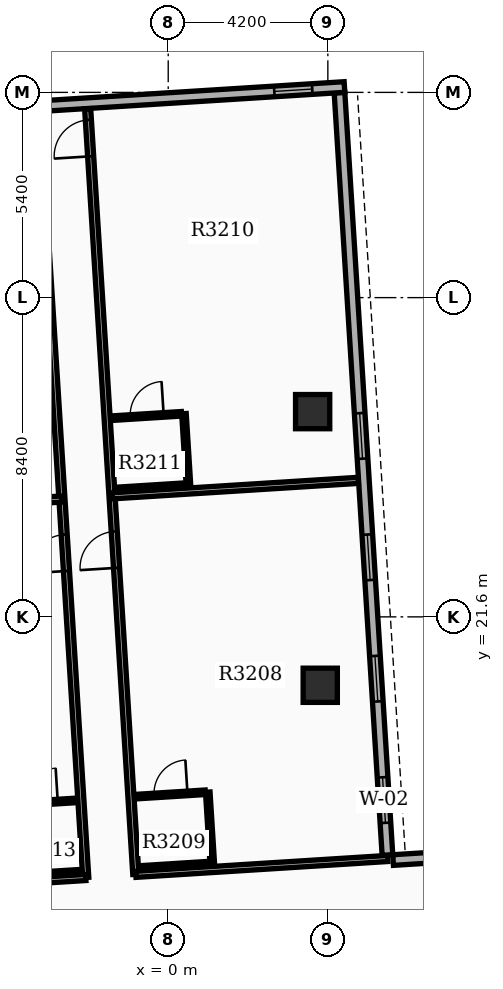
"""IFC4 building model, lengths in metres.
Left out: names, types, materials, properties, quantities, classifications, styles, units other than length and angle.
Written with IfcOpenShell. Run it as: python <this file> out.ifc"""

import sys

from ifc_helpers import new_model, si_unit, direction, frame, frame_2d, origin, origin_2d, place, context, subcontext, project, spatial, rectangle, extrude, element, fill, save


model = new_model("IFC4")
c1 = context("Model", 3, precision=1e-05, world=origin(), true_north=direction((0.0, 1.0)))
c2 = subcontext(c1, "Body", "Model", "MODEL_VIEW")
j1 = project(units=[si_unit("LENGTHUNIT", "METRE"), si_unit("PLANEANGLEUNIT", "RADIAN")], contexts=[c1])
p1 = place(None, origin())
s1 = spatial("IfcSite", under=j1, at=p1, CompositionType="ELEMENT")
p2 = place(p1, origin())
s2 = spatial("IfcBuilding", under=s1, at=p2, CompositionType="ELEMENT")
p3 = place(p2, frame((0.0, 0.0, 201.3)))
s3 = spatial("IfcBuildingStorey", under=s2, at=p3, CompositionType="ELEMENT", Elevation=201.3)
for number, where, z_axis, x_axis in (
    (1, (4.0, 19.8, 0.0), (0.0, 0.0, 1.0), (1.0, 0.0, 0.0)),
    (2, (3.8, 27.0, 0.0), (0.0, 0.0, 1.0), (1.0, 0.0, 0.0)),
):
    element("IfcColumn", number, at=place(p3, frame(where, z_axis=z_axis, x_axis=x_axis)), inside=s3, PredefinedType="COLUMN", context=c2, shape_type="SweptSolid", body=[
        extrude(rectangle(XDim=0.9, YDim=0.9, at=origin_2d()), origin(), (0.0, 0.0, 1.0), 3.9),
    ])
p4 = place(p3, frame((5.769, 15.333, 0.0), z_axis=(0.0, 0.0, 1.0), x_axis=(-0.062784355807, 0.998027116198, 0.0)))
e3 = element("IfcWall", 3, at=p4, inside=s3, PredefinedType="STANDARD", context=c2, shape_type="SweptSolid", body=[
    extrude(rectangle(XDim=20.1, YDim=0.28, at=frame_2d((10.05, 0.0))), origin(), (0.0, 0.0, 1.0), 3.18),
])
p5 = place(p4, frame((0.85, 0.0, 0.8)))
e4 = element("IfcOpeningElement", 4, at=p5, cuts=e3, PredefinedType="OPENING", context=c2, shape_type="SweptSolid", body=[
    extrude(rectangle(XDim=1.2, YDim=1.6, at=frame_2d((0.6, 0.8))), frame((0.0, 0.15, 0.0), z_axis=(0.0, -1.0, 0.0), x_axis=(1.0, 0.0, 0.0)), (0.0, 0.0, 1.0), 0.3),
])
p6 = place(p4, frame((4.05, 0.0, 0.8)))
e5 = element("IfcOpeningElement", 5, at=p6, cuts=e3, PredefinedType="OPENING", context=c2, shape_type="SweptSolid", body=[
    extrude(rectangle(XDim=1.2, YDim=1.6, at=frame_2d((0.6, 0.8))), frame((0.0, 0.15, 0.0), z_axis=(0.0, -1.0, 0.0), x_axis=(1.0, 0.0, 0.0)), (0.0, 0.0, 1.0), 0.3),
])
p7 = place(p4, frame((7.25, 0.0, 0.8)))
e6 = element("IfcOpeningElement", 6, at=p7, cuts=e3, PredefinedType="OPENING", context=c2, shape_type="SweptSolid", body=[
    extrude(rectangle(XDim=1.2, YDim=1.6, at=frame_2d((0.6, 0.8))), frame((0.0, 0.15, 0.0), z_axis=(0.0, -1.0, 0.0), x_axis=(1.0, 0.0, 0.0)), (0.0, 0.0, 1.0), 0.3),
])
p8 = place(p4, frame((10.45, 0.0, 0.8)))
e7 = element("IfcOpeningElement", 7, at=p8, cuts=e3, PredefinedType="OPENING", context=c2, shape_type="SweptSolid", body=[
    extrude(rectangle(XDim=1.2, YDim=1.6, at=frame_2d((0.6, 0.8))), frame((0.0, 0.15, 0.0), z_axis=(0.0, -1.0, 0.0), x_axis=(1.0, 0.0, 0.0)), (0.0, 0.0, 1.0), 0.3),
])
p9 = place(p3, frame((4.637, 35.541, 0.0), z_axis=(0.0, 0.0, 1.0), x_axis=(-0.998026318072, -0.062797041623, 0.0)))
e8 = element("IfcWall", 8, at=p9, inside=s3, PredefinedType="STANDARD", context=c2, shape_type="SweptSolid", body=[
    extrude(rectangle(XDim=13.72, YDim=0.28, at=frame_2d((6.86, 0.0))), origin(), (0.0, 0.0, 1.0), 3.18),
])
p10 = place(p9, frame((0.85, 0.0, 0.85)))
e9 = element("IfcOpeningElement", 9, at=p10, cuts=e8, PredefinedType="OPENING", context=c2, shape_type="SweptSolid", body=[
    extrude(rectangle(XDim=1.0, YDim=1.5, at=frame_2d((0.5, 0.75))), frame((0.0, 0.15, 0.0), z_axis=(0.0, -1.0, 0.0), x_axis=(1.0, 0.0, 0.0)), (0.0, 0.0, 1.0), 0.3),
])
p11 = place(p3, frame((12.205, 15.597, 0.0), z_axis=(0.0, 0.0, 1.0), x_axis=(-0.998024885752, -0.062819801181, 0.0)))
e10 = element("IfcWall", 10, at=p11, inside=s3, PredefinedType="STANDARD", context=c2, shape_type="SweptSolid", body=[
    extrude(rectangle(XDim=6.3, YDim=0.28, at=frame_2d((3.15, 0.0))), origin(), (0.0, 0.0, 1.0), 3.18),
])
p12 = place(p3, frame((-0.853, 14.826, 0.0), z_axis=(0.0, 0.0, 1.0), x_axis=(-0.062794751284, 0.99802646218, 0.0)))
e11 = element("IfcWall", 11, at=p12, inside=s3, PredefinedType="PARTITIONING", context=c2, shape_type="SweptSolid", body=[
    extrude(rectangle(XDim=20.182, YDim=0.16, at=frame_2d((10.091, 0.0))), origin(), (0.0, 0.0, 1.0), 3.17),
])
p13 = place(p12, frame((8.08, 0.0, 0.0)))
e12 = element("IfcOpeningElement", 12, at=p13, cuts=e11, PredefinedType="OPENING", context=c2, shape_type="SweptSolid", body=[
    extrude(rectangle(XDim=0.96, YDim=2.15, at=frame_2d((0.48, 1.075))), frame((0.0, 0.09, 0.0), z_axis=(0.0, -1.0, 0.0), x_axis=(1.0, 0.0, 0.0)), (0.0, 0.0, 1.0), 0.18),
])
p14 = place(p12, frame((18.93, 0.0, 0.0)))
e13 = element("IfcOpeningElement", 13, at=p14, cuts=e11, PredefinedType="OPENING", context=c2, shape_type="SweptSolid", body=[
    extrude(rectangle(XDim=0.96, YDim=2.15, at=frame_2d((0.48, 1.075))), frame((0.0, 0.09, 0.0), z_axis=(0.0, -1.0, 0.0), x_axis=(1.0, 0.0, 0.0)), (0.0, 0.0, 1.0), 0.18),
])
p15 = place(p3, frame((-0.853, 14.826, 0.0), z_axis=(0.0, 0.0, 1.0), x_axis=(0.998026165557, 0.062799465472, 0.0)))
e14 = element("IfcWall", 14, at=p15, inside=s3, PredefinedType="PARTITIONING", context=c2, shape_type="SweptSolid", body=[
    extrude(rectangle(XDim=6.64, YDim=0.16, at=frame_2d((3.32, 0.0))), origin(), (0.0, 0.0, 1.0), 3.17),
])
p16 = place(p3, frame((-1.479, 24.784, 0.0), z_axis=(0.0, 0.0, 1.0), x_axis=(0.998025855021, 0.062804400403, 0.0)))
e15 = element("IfcWall", 15, at=p16, inside=s3, PredefinedType="PARTITIONING", context=c2, shape_type="SweptSolid", body=[
    extrude(rectangle(XDim=6.492, YDim=0.16, at=frame_2d((3.246, 0.0))), origin(), (0.0, 0.0, 1.0), 3.17),
])
p17 = place(p3, frame((-0.841, 16.871, 0.0), z_axis=(0.0, 0.0, 1.0), x_axis=(0.998027443946, 0.062779145668, 0.0)))
e16 = element("IfcWall", 16, at=p17, inside=s3, PredefinedType="PARTITIONING", context=c2, shape_type="SweptSolid", body=[
    extrude(rectangle(XDim=1.82, YDim=0.12, at=frame_2d((0.91, 0.0))), origin(), (0.0, 0.0, 1.0), 3.17),
])
p18 = place(p17, frame((0.47, 0.0, 0.0)))
e17 = element("IfcOpeningElement", 17, at=p18, cuts=e16, PredefinedType="OPENING", context=c2, shape_type="SweptSolid", body=[
    extrude(rectangle(XDim=0.88, YDim=2.1, at=frame_2d((0.44, 1.05))), frame((0.0, 0.07, 0.0), z_axis=(0.0, -1.0, 0.0), x_axis=(1.0, 0.0, 0.0)), (0.0, 0.0, 1.0), 0.14),
])
p19 = place(p3, frame((-0.723, 14.994, 0.0), z_axis=(0.0, 0.0, 1.0), x_axis=(0.998027443946, 0.062779145668, 0.0)))
e18 = element("IfcWall", 18, at=p19, inside=s3, PredefinedType="PARTITIONING", context=c2, shape_type="SweptSolid", body=[
    extrude(rectangle(XDim=1.82, YDim=0.12, at=frame_2d((0.91, 0.0))), origin(), (0.0, 0.0, 1.0), 3.17),
])
p20 = place(p3, frame((1.158, 15.113, 0.0), z_axis=(0.0, 0.0, 1.0), x_axis=(-0.062855297722, 0.998022650819, 0.0)))
e19 = element("IfcWall", 19, at=p20, inside=s3, PredefinedType="PARTITIONING", context=c2, shape_type="SweptSolid", body=[
    extrude(rectangle(XDim=1.88, YDim=0.12, at=frame_2d((0.94, 0.0))), origin(), (0.0, 0.0, 1.0), 3.17),
])
p21 = place(p3, frame((-1.468, 26.829, 0.0), z_axis=(0.0, 0.0, 1.0), x_axis=(0.998027443946, 0.062779145668, 0.0)))
e20 = element("IfcWall", 20, at=p21, inside=s3, PredefinedType="PARTITIONING", context=c2, shape_type="SweptSolid", body=[
    extrude(rectangle(XDim=1.82, YDim=0.12, at=frame_2d((0.91, 0.0))), origin(), (0.0, 0.0, 1.0), 3.17),
])
p22 = place(p21, frame((0.47, 0.0, 0.0)))
e21 = element("IfcOpeningElement", 21, at=p22, cuts=e20, PredefinedType="OPENING", context=c2, shape_type="SweptSolid", body=[
    extrude(rectangle(XDim=0.88, YDim=2.1, at=frame_2d((0.44, 1.05))), frame((0.0, 0.07, 0.0), z_axis=(0.0, -1.0, 0.0), x_axis=(1.0, 0.0, 0.0)), (0.0, 0.0, 1.0), 0.14),
])
p23 = place(p3, frame((-1.349, 24.952, 0.0), z_axis=(0.0, 0.0, 1.0), x_axis=(0.998019030272, 0.062912758763, 0.0)))
e22 = element("IfcWall", 22, at=p23, inside=s3, PredefinedType="PARTITIONING", context=c2, shape_type="SweptSolid", body=[
    extrude(rectangle(XDim=1.82, YDim=0.12, at=frame_2d((0.91, 0.0))), origin(), (0.0, 0.0, 1.0), 3.17),
])
p24 = place(p3, frame((0.532, 25.071, 0.0), z_axis=(0.0, 0.0, 1.0), x_axis=(-0.062717813936, 0.998031300018, 0.0)))
e23 = element("IfcWall", 23, at=p24, inside=s3, PredefinedType="PARTITIONING", context=c2, shape_type="SweptSolid", body=[
    extrude(rectangle(XDim=1.88, YDim=0.12, at=frame_2d((0.94, 0.0))), origin(), (0.0, 0.0, 1.0), 3.17),
])
p25 = place(p3, frame((-2.17, 14.743, 0.0), z_axis=(0.0, 0.0, 1.0), x_axis=(-0.062795509413, 0.998026414479, 0.0)))
e24 = element("IfcWall", 24, at=p25, inside=s3, PredefinedType="PARTITIONING", context=c2, shape_type="SweptSolid", body=[
    extrude(rectangle(XDim=20.182, YDim=0.16, at=frame_2d((10.091, 0.0))), origin(), (0.0, 0.0, 1.0), 3.17),
])
p26 = place(p25, frame((8.08, 0.0, 0.0)))
e25 = element("IfcOpeningElement", 25, at=p26, cuts=e24, PredefinedType="OPENING", context=c2, shape_type="SweptSolid", body=[
    extrude(rectangle(XDim=0.96, YDim=2.15, at=frame_2d((0.48, 1.075))), frame((0.0, 0.09, 0.0), z_axis=(0.0, -1.0, 0.0), x_axis=(1.0, 0.0, 0.0)), (0.0, 0.0, 1.0), 0.18),
])
p27 = place(p25, frame((16.247, 0.0, 0.0)))
e26 = element("IfcOpeningElement", 26, at=p27, cuts=e24, PredefinedType="OPENING", context=c2, shape_type="SweptSolid", body=[
    extrude(rectangle(XDim=0.96, YDim=2.15, at=frame_2d((0.48, 1.075))), frame((0.0, 0.09, 0.0), z_axis=(0.0, -1.0, 0.0), x_axis=(1.0, 0.0, 0.0)), (0.0, 0.0, 1.0), 0.18),
])
p28 = place(p3, frame((-2.17, 14.743, 0.0), z_axis=(0.0, 0.0, 1.0), x_axis=(-0.998025093119, -0.06281650662, 0.0)))
e27 = element("IfcWall", 27, at=p28, inside=s3, PredefinedType="PARTITIONING", context=c2, shape_type="SweptSolid", body=[
    extrude(rectangle(XDim=5.48, YDim=0.16, at=frame_2d((2.74, 0.0))), origin(), (0.0, 0.0, 1.0), 3.17),
])
p29 = place(p3, frame((-2.796, 24.701, 0.0), z_axis=(0.0, 0.0, 1.0), x_axis=(-0.998027735445, -0.062774511414, 0.0)))
e28 = element("IfcWall", 28, at=p29, inside=s3, PredefinedType="PARTITIONING", context=c2, shape_type="SweptSolid", body=[
    extrude(rectangle(XDim=5.332, YDim=0.16, at=frame_2d((2.666, 0.0))), origin(), (0.0, 0.0, 1.0), 3.17),
])
p30 = place(p3, frame((-4.254, 16.656, 0.0), z_axis=(0.0, 0.0, 1.0), x_axis=(0.998027443946, 0.062779145668, 0.0)))
e29 = element("IfcWall", 29, at=p30, inside=s3, PredefinedType="PARTITIONING", context=c2, shape_type="SweptSolid", body=[
    extrude(rectangle(XDim=1.82, YDim=0.12, at=frame_2d((0.91, 0.0))), origin(), (0.0, 0.0, 1.0), 3.17),
])
p31 = place(p30, frame((0.47, 0.0, 0.0)))
e30 = element("IfcOpeningElement", 30, at=p31, cuts=e29, PredefinedType="OPENING", context=c2, shape_type="SweptSolid", body=[
    extrude(rectangle(XDim=0.88, YDim=2.1, at=frame_2d((0.44, 1.05))), frame((0.0, 0.07, 0.0), z_axis=(0.0, -1.0, 0.0), x_axis=(1.0, 0.0, 0.0)), (0.0, 0.0, 1.0), 0.14),
])
p32 = place(p3, frame((-4.136, 14.78, 0.0), z_axis=(0.0, 0.0, 1.0), x_axis=(0.998027443946, 0.062779145668, 0.0)))
e31 = element("IfcWall", 31, at=p32, inside=s3, PredefinedType="PARTITIONING", context=c2, shape_type="SweptSolid", body=[
    extrude(rectangle(XDim=1.82, YDim=0.12, at=frame_2d((0.91, 0.0))), origin(), (0.0, 0.0, 1.0), 3.17),
])
p33 = place(p5, origin())
e32 = element("IfcWindow", 32, at=p33, inside=s3, PartitioningType="SINGLE_PANEL", PredefinedType="WINDOW", context=c2, shape_type="SweptSolid", body=[
    extrude(rectangle(XDim=1.2, YDim=1.6, at=frame_2d((0.6, 0.8))), frame((0.0, 0.03, 0.0), z_axis=(0.0, -1.0, 0.0), x_axis=(1.0, 0.0, 0.0)), (0.0, 0.0, 1.0), 0.06),
])
fill(e4, e32)
p34 = place(p6, origin())
e33 = element("IfcWindow", 33, at=p34, inside=s3, PartitioningType="SINGLE_PANEL", PredefinedType="WINDOW", context=c2, shape_type="SweptSolid", body=[
    extrude(rectangle(XDim=1.2, YDim=1.6, at=frame_2d((0.6, 0.8))), frame((0.0, 0.03, 0.0), z_axis=(0.0, -1.0, 0.0), x_axis=(1.0, 0.0, 0.0)), (0.0, 0.0, 1.0), 0.06),
])
fill(e5, e33)
p35 = place(p7, origin())
e34 = element("IfcWindow", 34, at=p35, inside=s3, PartitioningType="SINGLE_PANEL", PredefinedType="WINDOW", context=c2, shape_type="SweptSolid", body=[
    extrude(rectangle(XDim=1.2, YDim=1.6, at=frame_2d((0.6, 0.8))), frame((0.0, 0.03, 0.0), z_axis=(0.0, -1.0, 0.0), x_axis=(1.0, 0.0, 0.0)), (0.0, 0.0, 1.0), 0.06),
])
fill(e6, e34)
p36 = place(p8, origin())
e35 = element("IfcWindow", 35, at=p36, inside=s3, PartitioningType="SINGLE_PANEL", PredefinedType="WINDOW", context=c2, shape_type="SweptSolid", body=[
    extrude(rectangle(XDim=1.2, YDim=1.6, at=frame_2d((0.6, 0.8))), frame((0.0, 0.03, 0.0), z_axis=(0.0, -1.0, 0.0), x_axis=(1.0, 0.0, 0.0)), (0.0, 0.0, 1.0), 0.06),
])
fill(e7, e35)
p37 = place(p10, origin())
e36 = element("IfcWindow", 36, at=p37, inside=s3, PartitioningType="SINGLE_PANEL", PredefinedType="WINDOW", context=c2, shape_type="SweptSolid", body=[
    extrude(rectangle(XDim=1.0, YDim=1.5, at=frame_2d((0.5, 0.75))), frame((0.0, 0.03, 0.0), z_axis=(0.0, -1.0, 0.0), x_axis=(1.0, 0.0, 0.0)), (0.0, 0.0, 1.0), 0.06),
])
fill(e9, e36)
p38 = place(p13, origin())
e37 = element("IfcDoor", 37, at=p38, inside=s3, OperationType="SINGLE_SWING_LEFT", PredefinedType="DOOR", context=c2, shape_type="SweptSolid", body=[
    extrude(rectangle(XDim=0.96, YDim=2.15, at=frame_2d((0.48, 1.075))), frame((0.0, 0.025, 0.0), z_axis=(0.0, -1.0, 0.0), x_axis=(1.0, 0.0, 0.0)), (0.0, 0.0, 1.0), 0.05),
])
fill(e12, e37)
p39 = place(p18, origin())
e38 = element("IfcDoor", 38, at=p39, inside=s3, OperationType="SINGLE_SWING_RIGHT", PredefinedType="DOOR", context=c2, shape_type="SweptSolid", body=[
    extrude(rectangle(XDim=0.88, YDim=2.1, at=frame_2d((0.44, 1.05))), frame((0.0, 0.025, 0.0), z_axis=(0.0, -1.0, 0.0), x_axis=(1.0, 0.0, 0.0)), (0.0, 0.0, 1.0), 0.05),
])
fill(e17, e38)
p40 = place(p14, origin())
e39 = element("IfcDoor", 39, at=p40, inside=s3, OperationType="SINGLE_SWING_LEFT", PredefinedType="DOOR", context=c2, shape_type="SweptSolid", body=[
    extrude(rectangle(XDim=0.96, YDim=2.15, at=frame_2d((0.48, 1.075))), frame((0.0, 0.025, 0.0), z_axis=(0.0, -1.0, 0.0), x_axis=(1.0, 0.0, 0.0)), (0.0, 0.0, 1.0), 0.05),
])
fill(e13, e39)
p41 = place(p22, origin())
e40 = element("IfcDoor", 40, at=p41, inside=s3, OperationType="SINGLE_SWING_RIGHT", PredefinedType="DOOR", context=c2, shape_type="SweptSolid", body=[
    extrude(rectangle(XDim=0.88, YDim=2.1, at=frame_2d((0.44, 1.05))), frame((0.0, 0.025, 0.0), z_axis=(0.0, -1.0, 0.0), x_axis=(1.0, 0.0, 0.0)), (0.0, 0.0, 1.0), 0.05),
])
fill(e21, e40)
p42 = place(p26, origin())
e41 = element("IfcDoor", 41, at=p42, inside=s3, OperationType="SINGLE_SWING_LEFT", PredefinedType="DOOR", context=c2, shape_type="SweptSolid", body=[
    extrude(rectangle(XDim=0.96, YDim=2.15, at=frame_2d((0.48, 1.075))), frame((0.0, 0.025, 0.0), z_axis=(0.0, -1.0, 0.0), x_axis=(1.0, 0.0, 0.0)), (0.0, 0.0, 1.0), 0.05),
])
fill(e25, e41)
p43 = place(p31, origin())
e42 = element("IfcDoor", 42, at=p43, inside=s3, OperationType="SINGLE_SWING_RIGHT", PredefinedType="DOOR", context=c2, shape_type="SweptSolid", body=[
    extrude(rectangle(XDim=0.88, YDim=2.1, at=frame_2d((0.44, 1.05))), frame((0.0, 0.025, 0.0), z_axis=(0.0, -1.0, 0.0), x_axis=(1.0, 0.0, 0.0)), (0.0, 0.0, 1.0), 0.05),
])
fill(e30, e42)
save(model, sys.argv[1])
